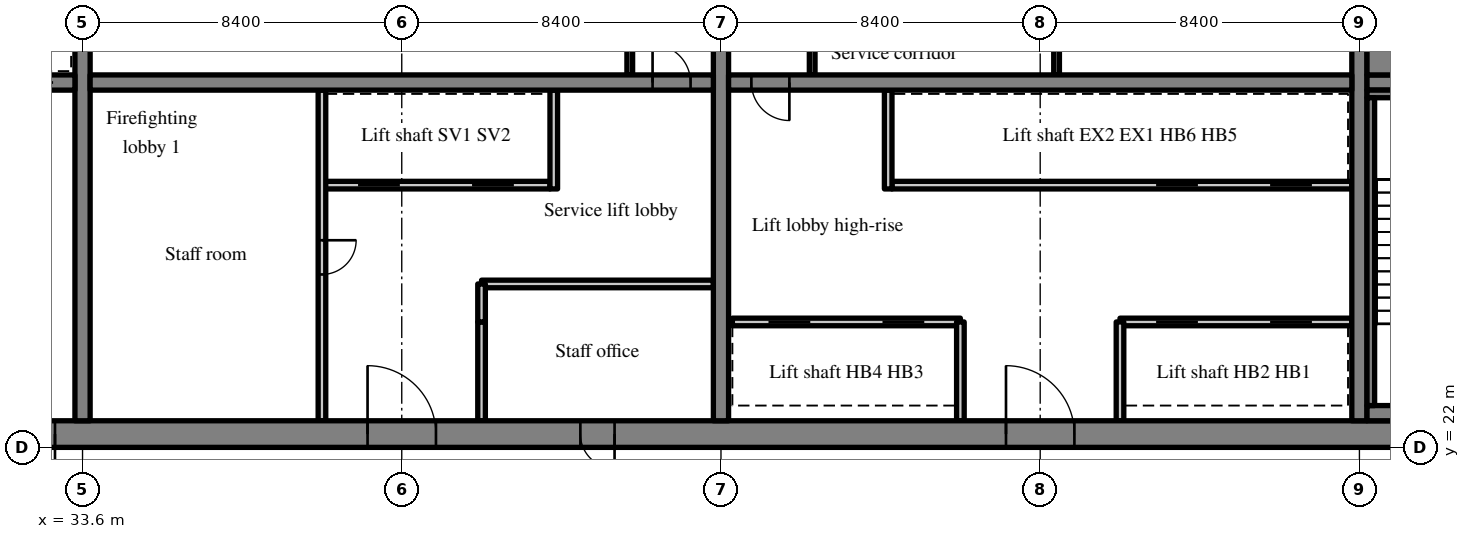
"""IFC4 building model, lengths in metres.
Left out: names, types, materials, properties, quantities, classifications, styles, units other than length and angle.
Written with IfcOpenShell. Run it as: python <this file> out.ifc"""

import sys

from ifc_helpers import new_model, si_unit, direction, frame, frame_2d, origin, place, context, subcontext, project, spatial, rectangle, extrude, source, transform, mapped, element, fill, save


model = new_model("IFC4")
c1 = context("Model", 3, precision=1e-05, world=origin(), true_north=direction((0.0, 1.0)))
c2 = subcontext(c1, "Body", "Model", "MODEL_VIEW")
j1 = project(units=[si_unit("LENGTHUNIT", "METRE"), si_unit("PLANEANGLEUNIT", "RADIAN")], contexts=[c1])
p1 = place(None, origin())
s1 = spatial("IfcSite", under=j1, at=p1, CompositionType="ELEMENT")
p2 = place(p1, origin())
s2 = spatial("IfcBuilding", under=s1, at=p2, CompositionType="ELEMENT")
p3 = place(p2, frame((0.0, 0.0, 151.6)))
s3 = spatial("IfcBuildingStorey", under=s2, at=p3, CompositionType="ELEMENT", Elevation=151.6)
m1 = source(origin(), c2, "Body", "SweptSolid", [
    extrude(rectangle(XDim=50.4, YDim=0.7, at=frame_2d((25.2, 0.0))), origin(), (0.0, 0.0, 1.0), 3.52),
])
p4 = place(p3, frame((25.2, 22.35, 0.0), z_axis=(0.0, 0.0, 1.0), x_axis=(1.0, 0.0, 0.0)))
e1 = element("IfcWall", 1, at=p4, inside=s3, PredefinedType="SHEAR", context=c2, shape_type="MappedRepresentation", body=[
    mapped(m1, transform((0.0, 0.0, 0.0), scale=1.0)),
])
m2 = source(origin(), c2, "Body", "SweptSolid", [
    extrude(rectangle(XDim=1.8, YDim=2.1, at=frame_2d((0.9, 1.05))), frame((0.0, 0.36, 0.0), z_axis=(0.0, -1.0, 0.0), x_axis=(1.0, 0.0, 0.0)), (0.0, 0.0, 1.0), 0.72),
])
p5 = place(p4, frame((15.9, 0.0, 0.0)))
e2 = element("IfcOpeningElement", 2, at=p5, cuts=e1, PredefinedType="OPENING", context=c2, shape_type="MappedRepresentation", body=[
    mapped(m2, transform((0.0, 0.0, 0.0), scale=1.0)),
])
m3 = source(origin(), c2, "Body", "SweptSolid", [
    extrude(rectangle(XDim=0.9, YDim=2.1, at=frame_2d((0.45, 1.05))), frame((0.0, 0.36, 0.0), z_axis=(0.0, -1.0, 0.0), x_axis=(1.0, 0.0, 0.0)), (0.0, 0.0, 1.0), 0.72),
])
p6 = place(p4, frame((21.5, 0.0, 0.0)))
e3 = element("IfcOpeningElement", 3, at=p6, cuts=e1, PredefinedType="OPENING", context=c2, shape_type="MappedRepresentation", body=[
    mapped(m3, transform((0.0, 0.0, 0.0), scale=1.0)),
])
p7 = place(p4, frame((32.7, 0.0, 0.0)))
e4 = element("IfcOpeningElement", 4, at=p7, cuts=e1, PredefinedType="OPENING", context=c2, shape_type="MappedRepresentation", body=[
    mapped(m2, transform((0.0, 0.0, 0.0), scale=1.0)),
])
m4 = source(origin(), c2, "Body", "SweptSolid", [
    extrude(rectangle(XDim=1.2, YDim=2.1, at=frame_2d((0.6, 1.05))), frame((0.0, 0.36, 0.0), z_axis=(0.0, -1.0, 0.0), x_axis=(1.0, 0.0, 0.0)), (0.0, 0.0, 1.0), 0.72),
])
p8 = place(p4, frame((6.475, 0.0, 0.0)))
e5 = element("IfcOpeningElement", 5, at=p8, cuts=e1, PredefinedType="OPENING", context=c2, shape_type="MappedRepresentation", body=[
    mapped(m4, transform((0.0, 0.0, 0.0), scale=1.0)),
])
p9 = place(p4, frame((47.875, 0.0, 0.0)))
e6 = element("IfcOpeningElement", 6, at=p9, cuts=e1, PredefinedType="OPENING", context=c2, shape_type="MappedRepresentation", body=[
    mapped(m4, transform((0.0, 0.0, 0.0), scale=1.0)),
])
m5 = source(origin(), c2, "Body", "SweptSolid", [
    extrude(rectangle(XDim=18.6, YDim=0.4, at=frame_2d((9.3, 0.0))), origin(), (0.0, 0.0, 1.0), 3.52),
])
p10 = place(p3, frame((33.6, 22.7, 0.0), z_axis=(0.0, 0.0, 1.0), x_axis=(0.0, 1.0, 0.0)))
e7 = element("IfcWall", 7, at=p10, inside=s3, PredefinedType="SHEAR", context=c2, shape_type="MappedRepresentation", body=[
    mapped(m5, transform((0.0, 0.0, 0.0), scale=1.0)),
])
m6 = source(origin(), c2, "Body", "SweptSolid", [
    extrude(rectangle(XDim=1.1, YDim=2.1, at=frame_2d((0.55, 1.05))), frame((0.0, 0.21, 0.0), z_axis=(0.0, -1.0, 0.0), x_axis=(1.0, 0.0, 0.0)), (0.0, 0.0, 1.0), 0.42),
])
p11 = place(p10, frame((12.75, 0.0, 0.0)))
e8 = element("IfcOpeningElement", 8, at=p11, cuts=e7, PredefinedType="OPENING", context=c2, shape_type="MappedRepresentation", body=[
    mapped(m6, transform((0.0, 0.0, 0.0), scale=1.0)),
])
p12 = place(p3, frame((50.4, 22.7, 0.0), z_axis=(0.0, 0.0, 1.0), x_axis=(0.0, 1.0, 0.0)))
e9 = element("IfcWall", 9, at=p12, inside=s3, PredefinedType="SHEAR", context=c2, shape_type="MappedRepresentation", body=[
    mapped(m5, transform((0.0, 0.0, 0.0), scale=1.0)),
])
p13 = place(p12, frame((12.75, 0.0, 0.0)))
e10 = element("IfcOpeningElement", 10, at=p13, cuts=e9, PredefinedType="OPENING", context=c2, shape_type="MappedRepresentation", body=[
    mapped(m6, transform((0.0, 0.0, 0.0), scale=1.0)),
])
p14 = place(p3, frame((67.2, 22.7, 0.0), z_axis=(0.0, 0.0, 1.0), x_axis=(0.0, 1.0, 0.0)))
e11 = element("IfcWall", 11, at=p14, inside=s3, PredefinedType="SHEAR", context=c2, shape_type="MappedRepresentation", body=[
    mapped(m5, transform((0.0, 0.0, 0.0), scale=1.0)),
])
m7 = source(origin(), c2, "Body", "SweptSolid", [
    extrude(rectangle(XDim=7.5, YDim=0.4, at=frame_2d((3.75, 0.0))), origin(), (0.0, 0.0, 1.0), 3.52),
])
p15 = place(p3, frame((25.9, 31.6, 0.0), z_axis=(0.0, 0.0, 1.0), x_axis=(1.0, 0.0, 0.0)))
e12 = element("IfcWall", 12, at=p15, inside=s3, PredefinedType="SHEAR", context=c2, shape_type="MappedRepresentation", body=[
    mapped(m7, transform((0.0, 0.0, 0.0), scale=1.0)),
])
p16 = place(p15, frame((5.825, 0.0, 0.0)))
e13 = element("IfcOpeningElement", 13, at=p16, cuts=e12, PredefinedType="OPENING", context=c2, shape_type="MappedRepresentation", body=[
    mapped(m6, transform((0.0, 0.0, 0.0), scale=1.0)),
])
m8 = source(origin(), c2, "Body", "SweptSolid", [
    extrude(rectangle(XDim=16.4, YDim=0.4, at=frame_2d((8.2, 0.0))), origin(), (0.0, 0.0, 1.0), 3.52),
])
p17 = place(p3, frame((33.8, 31.6, 0.0), z_axis=(0.0, 0.0, 1.0), x_axis=(1.0, 0.0, 0.0)))
e14 = element("IfcWall", 14, at=p17, inside=s3, PredefinedType="SHEAR", context=c2, shape_type="MappedRepresentation", body=[
    mapped(m8, transform((0.0, 0.0, 0.0), scale=1.0)),
])
m9 = source(origin(), c2, "Body", "SweptSolid", [
    extrude(rectangle(XDim=1.0, YDim=2.1, at=frame_2d((0.5, 1.05))), frame((0.0, 0.21, 0.0), z_axis=(0.0, -1.0, 0.0), x_axis=(1.0, 0.0, 0.0)), (0.0, 0.0, 1.0), 0.42),
])
p18 = place(p17, frame((14.8, 0.0, 0.0)))
e15 = element("IfcOpeningElement", 15, at=p18, cuts=e14, PredefinedType="OPENING", context=c2, shape_type="MappedRepresentation", body=[
    mapped(m9, transform((0.0, 0.0, 0.0), scale=1.0)),
])
p19 = place(p3, frame((50.6, 31.6, 0.0), z_axis=(0.0, 0.0, 1.0), x_axis=(1.0, 0.0, 0.0)))
e16 = element("IfcWall", 16, at=p19, inside=s3, PredefinedType="SHEAR", context=c2, shape_type="MappedRepresentation", body=[
    mapped(m8, transform((0.0, 0.0, 0.0), scale=1.0)),
])
p20 = place(p19, frame((0.6, 0.0, 0.0)))
e17 = element("IfcOpeningElement", 17, at=p20, cuts=e16, PredefinedType="OPENING", context=c2, shape_type="MappedRepresentation", body=[
    mapped(m9, transform((0.0, 0.0, 0.0), scale=1.0)),
])
p21 = place(p3, frame((67.4, 31.6, 0.0), z_axis=(0.0, 0.0, 1.0), x_axis=(1.0, 0.0, 0.0)))
e18 = element("IfcWall", 18, at=p21, inside=s3, PredefinedType="SHEAR", context=c2, shape_type="MappedRepresentation", body=[
    mapped(m7, transform((0.0, 0.0, 0.0), scale=1.0)),
])
p22 = place(p21, frame((5.725, 0.0, 0.0)))
e19 = element("IfcOpeningElement", 19, at=p22, cuts=e18, PredefinedType="OPENING", context=c2, shape_type="MappedRepresentation", body=[
    mapped(m6, transform((0.0, 0.0, 0.0), scale=1.0)),
])
m10 = source(origin(), c2, "Body", "SweptSolid", [
    extrude(rectangle(XDim=6.0, YDim=0.2, at=frame_2d((3.0, 0.0))), origin(), (0.0, 0.0, 1.0), 3.52),
])
p23 = place(p3, frame((39.9, 28.9, 0.0), z_axis=(0.0, 0.0, 1.0), x_axis=(1.0, 0.0, 0.0)))
e20 = element("IfcWall", 20, at=p23, inside=s3, PredefinedType="SOLIDWALL", context=c2, shape_type="MappedRepresentation", body=[
    mapped(m10, transform((0.0, 0.0, 0.0), scale=1.0)),
])
m11 = source(origin(), c2, "Body", "SweptSolid", [
    extrude(rectangle(XDim=1.1, YDim=2.1, at=frame_2d((0.55, 1.05))), frame((0.0, 0.11, 0.0), z_axis=(0.0, -1.0, 0.0), x_axis=(1.0, 0.0, 0.0)), (0.0, 0.0, 1.0), 0.22),
])
p24 = place(p23, frame((0.95, 0.0, 0.0)))
e21 = element("IfcOpeningElement", 21, at=p24, cuts=e20, PredefinedType="OPENING", context=c2, shape_type="MappedRepresentation", body=[
    mapped(m11, transform((0.0, 0.0, 0.0), scale=1.0)),
])
p25 = place(p23, frame((3.95, 0.0, 0.0)))
e22 = element("IfcOpeningElement", 22, at=p25, cuts=e20, PredefinedType="OPENING", context=c2, shape_type="MappedRepresentation", body=[
    mapped(m11, transform((0.0, 0.0, 0.0), scale=1.0)),
])
m12 = source(origin(), c2, "Body", "SweptSolid", [
    extrude(rectangle(XDim=8.7, YDim=0.2, at=frame_2d((4.35, 0.0))), origin(), (0.0, 0.0, 1.0), 3.52),
])
p26 = place(p3, frame((39.9, 22.7, 0.0), z_axis=(0.0, 0.0, 1.0), x_axis=(0.0, 1.0, 0.0)))
e23 = element("IfcWall", 23, at=p26, inside=s3, PredefinedType="PARTITIONING", context=c2, shape_type="MappedRepresentation", body=[
    mapped(m12, transform((0.0, 0.0, 0.0), scale=1.0)),
])
m13 = source(origin(), c2, "Body", "SweptSolid", [
    extrude(rectangle(XDim=0.9, YDim=2.1, at=frame_2d((0.45, 1.05))), frame((0.0, 0.11, 0.0), z_axis=(0.0, -1.0, 0.0), x_axis=(1.0, 0.0, 0.0)), (0.0, 0.0, 1.0), 0.22),
])
p27 = place(p26, frame((3.85, 0.0, 0.0)))
e24 = element("IfcOpeningElement", 24, at=p27, cuts=e23, PredefinedType="OPENING", context=c2, shape_type="MappedRepresentation", body=[
    mapped(m13, transform((0.0, 0.0, 0.0), scale=1.0)),
])
m14 = source(origin(), c2, "Body", "SweptSolid", [
    extrude(rectangle(XDim=2.6, YDim=0.2, at=frame_2d((1.3, 0.0))), origin(), (0.0, 0.0, 1.0), 3.52),
])
p28 = place(p3, frame((44.1, 22.7, 0.0), z_axis=(0.0, 0.0, 1.0), x_axis=(0.0, 1.0, 0.0)))
e25 = element("IfcWall", 25, at=p28, inside=s3, PredefinedType="PARTITIONING", context=c2, shape_type="MappedRepresentation", body=[
    mapped(m14, transform((0.0, 0.0, 0.0), scale=1.0)),
])
m15 = source(origin(), c2, "Body", "SweptSolid", [
    extrude(rectangle(XDim=2.6, YDim=0.2, at=frame_2d((1.3, 0.0))), origin(), (0.0, 0.0, 1.0), 3.52),
])
p29 = place(p3, frame((46.0, 28.8, 0.0), z_axis=(0.0, 0.0, 1.0), x_axis=(0.0, 1.0, 0.0)))
e26 = element("IfcWall", 26, at=p29, inside=s3, PredefinedType="SOLIDWALL", context=c2, shape_type="MappedRepresentation", body=[
    mapped(m15, transform((0.0, 0.0, 0.0), scale=1.0)),
])
m16 = source(origin(), c2, "Body", "SweptSolid", [
    extrude(rectangle(XDim=6.1, YDim=0.2, at=frame_2d((3.05, 0.0))), origin(), (0.0, 0.0, 1.0), 3.52),
])
p30 = place(p3, frame((44.1, 26.3, 0.0), z_axis=(0.0, 0.0, 1.0), x_axis=(1.0, 0.0, 0.0)))
e27 = element("IfcWall", 27, at=p30, inside=s3, PredefinedType="PARTITIONING", context=c2, shape_type="MappedRepresentation", body=[
    mapped(m16, transform((0.0, 0.0, 0.0), scale=1.0)),
])
m17 = source(origin(), c2, "Body", "SweptSolid", [
    extrude(rectangle(XDim=1.0, YDim=0.2, at=frame_2d((0.5, 0.0))), origin(), (0.0, 0.0, 1.0), 3.52),
])
p31 = place(p3, frame((44.1, 25.3, 0.0), z_axis=(0.0, 0.0, 1.0), x_axis=(0.0, 1.0, 0.0)))
e28 = element("IfcWall", 28, at=p31, inside=s3, PredefinedType="PARTITIONING", context=c2, shape_type="MappedRepresentation", body=[
    mapped(m17, transform((0.0, 0.0, 0.0), scale=1.0)),
])
m18 = source(origin(), c2, "Body", "SweptSolid", [
    extrude(rectangle(XDim=3.2, YDim=0.15, at=frame_2d((1.6, 0.0))), origin(), (0.0, 0.0, 1.0), 3.52),
])
p32 = place(p3, frame((48.0, 31.8, 0.0), z_axis=(0.0, 0.0, 1.0), x_axis=(0.0, 1.0, 0.0)))
e29 = element("IfcWall", 29, at=p32, inside=s3, PredefinedType="PARTITIONING", context=c2, shape_type="MappedRepresentation", body=[
    mapped(m18, transform((0.0, 0.0, 0.0), scale=1.0)),
])
m19 = source(origin(), c2, "Body", "SweptSolid", [
    extrude(rectangle(XDim=6.1, YDim=0.2, at=frame_2d((3.05, 0.0))), origin(), (0.0, 0.0, 1.0), 3.52),
])
p33 = place(p3, frame((67.0, 25.3, 0.0), z_axis=(0.0, 0.0, 1.0), x_axis=(-1.0, 0.0, 0.0)))
e30 = element("IfcWall", 30, at=p33, inside=s3, PredefinedType="SOLIDWALL", context=c2, shape_type="MappedRepresentation", body=[
    mapped(m19, transform((0.0, 0.0, 0.0), scale=1.0)),
])
p34 = place(p33, frame((1.05, 0.0, 0.0)))
e31 = element("IfcOpeningElement", 31, at=p34, cuts=e30, PredefinedType="OPENING", context=c2, shape_type="MappedRepresentation", body=[
    mapped(m11, transform((0.0, 0.0, 0.0), scale=1.0)),
])
p35 = place(p33, frame((4.05, 0.0, 0.0)))
e32 = element("IfcOpeningElement", 32, at=p35, cuts=e30, PredefinedType="OPENING", context=c2, shape_type="MappedRepresentation", body=[
    mapped(m11, transform((0.0, 0.0, 0.0), scale=1.0)),
])
p36 = place(p3, frame((56.7, 25.3, 0.0), z_axis=(0.0, 0.0, 1.0), x_axis=(-1.0, 0.0, 0.0)))
e33 = element("IfcWall", 33, at=p36, inside=s3, PredefinedType="SOLIDWALL", context=c2, shape_type="MappedRepresentation", body=[
    mapped(m10, transform((0.0, 0.0, 0.0), scale=1.0)),
])
p37 = place(p36, frame((0.95, 0.0, 0.0)))
e34 = element("IfcOpeningElement", 34, at=p37, cuts=e33, PredefinedType="OPENING", context=c2, shape_type="MappedRepresentation", body=[
    mapped(m11, transform((0.0, 0.0, 0.0), scale=1.0)),
])
p38 = place(p36, frame((3.95, 0.0, 0.0)))
e35 = element("IfcOpeningElement", 35, at=p38, cuts=e33, PredefinedType="OPENING", context=c2, shape_type="MappedRepresentation", body=[
    mapped(m11, transform((0.0, 0.0, 0.0), scale=1.0)),
])
m20 = source(origin(), c2, "Body", "SweptSolid", [
    extrude(rectangle(XDim=12.1, YDim=0.2, at=frame_2d((6.05, 0.0))), origin(), (0.0, 0.0, 1.0), 3.52),
])
p39 = place(p3, frame((67.0, 28.9, 0.0), z_axis=(0.0, 0.0, 1.0), x_axis=(-1.0, 0.0, 0.0)))
e36 = element("IfcWall", 36, at=p39, inside=s3, PredefinedType="SOLIDWALL", context=c2, shape_type="MappedRepresentation", body=[
    mapped(m20, transform((0.0, 0.0, 0.0), scale=1.0)),
])
p40 = place(p39, frame((1.05, 0.0, 0.0)))
e37 = element("IfcOpeningElement", 37, at=p40, cuts=e36, PredefinedType="OPENING", context=c2, shape_type="MappedRepresentation", body=[
    mapped(m11, transform((0.0, 0.0, 0.0), scale=1.0)),
])
p41 = place(p39, frame((4.05, 0.0, 0.0)))
e38 = element("IfcOpeningElement", 38, at=p41, cuts=e36, PredefinedType="OPENING", context=c2, shape_type="MappedRepresentation", body=[
    mapped(m11, transform((0.0, 0.0, 0.0), scale=1.0)),
])
for number, where, z_axis, x_axis in (
    (39, (60.9, 22.7, 0.0), (0.0, 0.0, 1.0), (0.0, 1.0, 0.0)),
    (40, (56.7, 22.7, 0.0), (0.0, 0.0, 1.0), (0.0, 1.0, 0.0)),
):
    element("IfcWall", number, at=place(p3, frame(where, z_axis=z_axis, x_axis=x_axis)), inside=s3, PredefinedType="SOLIDWALL", context=c2, shape_type="MappedRepresentation", body=[
        mapped(m14, transform((0.0, 0.0, 0.0), scale=1.0)),
    ])
p42 = place(p3, frame((54.8, 28.8, 0.0), z_axis=(0.0, 0.0, 1.0), x_axis=(0.0, 1.0, 0.0)))
e41 = element("IfcWall", 41, at=p42, inside=s3, PredefinedType="SOLIDWALL", context=c2, shape_type="MappedRepresentation", body=[
    mapped(m15, transform((0.0, 0.0, 0.0), scale=1.0)),
])
for number, where, z_axis, x_axis in (
    (42, (52.8, 31.8, 0.0), (0.0, 0.0, 1.0), (0.0, 1.0, 0.0)),
    (43, (59.231, 31.8, 0.0), (0.0, 0.0, 1.0), (0.0, 1.0, 0.0)),
):
    element("IfcWall", number, at=place(p3, frame(where, z_axis=z_axis, x_axis=x_axis)), inside=s3, PredefinedType="PARTITIONING", context=c2, shape_type="MappedRepresentation", body=[
        mapped(m18, transform((0.0, 0.0, 0.0), scale=1.0)),
    ])
m21 = source(origin(), c2, "Body", "SweptSolid", [
    extrude(rectangle(XDim=4.85, YDim=0.4, at=frame_2d((2.425, 0.0))), origin(), (0.0, 0.0, 1.0), 3.52),
])
p43 = place(p3, frame((67.4, 22.9, 0.0), z_axis=(0.0, 0.0, 1.0), x_axis=(1.0, 0.0, 0.0)))
e44 = element("IfcWall", 44, at=p43, inside=s3, PredefinedType="SOLIDWALL", context=c2, shape_type="MappedRepresentation", body=[
    mapped(m21, transform((0.0, 0.0, 0.0), scale=1.0)),
])
m22 = source(origin(), c2, "Body", "SweptSolid", [
    extrude(rectangle(XDim=4.85, YDim=0.2, at=frame_2d((2.425, 0.0))), origin(), (0.0, 0.0, 1.0), 3.52),
])
p44 = place(p3, frame((67.4, 31.3, 0.0), z_axis=(0.0, 0.0, 1.0), x_axis=(1.0, 0.0, 0.0)))
e45 = element("IfcWall", 45, at=p44, inside=s3, PredefinedType="SOLIDWALL", context=c2, shape_type="MappedRepresentation", body=[
    mapped(m22, transform((0.0, 0.0, 0.0), scale=1.0)),
])
m23 = source(origin(), c2, "Body", "SweptSolid", [
    extrude(rectangle(XDim=8.1, YDim=0.2, at=frame_2d((4.05, 0.0))), origin(), (0.0, 0.0, 1.0), 3.52),
])
p45 = place(p3, frame((67.5, 23.1, 0.0), z_axis=(0.0, 0.0, 1.0), x_axis=(0.0, 1.0, 0.0)))
e46 = element("IfcWall", 46, at=p45, inside=s3, PredefinedType="SOLIDWALL", context=c2, shape_type="MappedRepresentation", body=[
    mapped(m23, transform((0.0, 0.0, 0.0), scale=1.0)),
])
m24 = source(origin(), c2, "Body", "SweptSolid", [
    extrude(rectangle(XDim=4.85, YDim=1.0, at=frame_2d((2.425, 0.0))), origin(), (0.0, 0.0, 1.0), 3.52),
])
p46 = place(p3, frame((67.4, 32.3, 0.0), z_axis=(0.0, 0.0, 1.0), x_axis=(1.0, 0.0, 0.0)))
e47 = element("IfcWall", 47, at=p46, inside=s3, PredefinedType="SOLIDWALL", context=c2, shape_type="MappedRepresentation", body=[
    mapped(m24, transform((0.0, 0.0, 0.0), scale=1.0)),
])
m25 = source(origin(), c2, "Body", "SweptSolid", [
    extrude(rectangle(XDim=1.8, YDim=2.1, at=frame_2d((0.9, 1.05))), frame((0.0, 0.275, 0.0), z_axis=(0.0, -1.0, 0.0), x_axis=(1.0, 0.0, 0.0)), (0.0, 0.0, 1.0), 0.05),
])
p47 = place(p5, origin())
e48 = element("IfcDoor", 48, at=p47, inside=s3, OperationType="DOUBLE_DOOR_SINGLE_SWING", PredefinedType="DOOR", context=c2, shape_type="MappedRepresentation", body=[
    mapped(m25, transform((0.0, 0.0, 0.0), scale=1.0)),
])
fill(e2, e48)
m26 = source(origin(), c2, "Body", "SweptSolid", [
    extrude(rectangle(XDim=1.0, YDim=2.1, at=frame_2d((0.5, 1.05))), frame((0.0, 0.025, 0.0), z_axis=(0.0, -1.0, 0.0), x_axis=(1.0, 0.0, 0.0)), (0.0, 0.0, 1.0), 0.05),
])
p48 = place(p18, origin())
e49 = element("IfcDoor", 49, at=p48, inside=s3, OperationType="SINGLE_SWING_LEFT", PredefinedType="DOOR", context=c2, shape_type="MappedRepresentation", body=[
    mapped(m26, transform((0.0, 0.0, 0.0), scale=1.0)),
])
fill(e15, e49)
m27 = source(origin(), c2, "Body", "SweptSolid", [
    extrude(rectangle(XDim=1.1, YDim=2.1, at=frame_2d((0.55, 1.05))), frame((0.0, 0.025, 0.0), z_axis=(0.0, -1.0, 0.0), x_axis=(1.0, 0.0, 0.0)), (0.0, 0.0, 1.0), 0.05),
])
p49 = place(p24, origin())
e50 = element("IfcDoor", 50, at=p49, inside=s3, OperationType="SLIDING_TO_LEFT", PredefinedType="DOOR", context=c2, shape_type="MappedRepresentation", body=[
    mapped(m27, transform((0.0, 0.0, 0.0), scale=1.0)),
])
fill(e21, e50)
p50 = place(p25, origin())
e51 = element("IfcDoor", 51, at=p50, inside=s3, OperationType="SLIDING_TO_RIGHT", PredefinedType="DOOR", context=c2, shape_type="MappedRepresentation", body=[
    mapped(m27, transform((0.0, 0.0, 0.0), scale=1.0)),
])
fill(e22, e51)
m28 = source(origin(), c2, "Body", "SweptSolid", [
    extrude(rectangle(XDim=0.9, YDim=2.1, at=frame_2d((0.45, 1.05))), frame((0.0, 0.025, 0.0), z_axis=(0.0, -1.0, 0.0), x_axis=(1.0, 0.0, 0.0)), (0.0, 0.0, 1.0), 0.05),
])
p51 = place(p27, origin())
e52 = element("IfcDoor", 52, at=p51, inside=s3, OperationType="SINGLE_SWING_RIGHT", PredefinedType="DOOR", context=c2, shape_type="MappedRepresentation", body=[
    mapped(m28, transform((0.0, 0.0, 0.0), scale=1.0)),
])
fill(e24, e52)
m29 = source(origin(), c2, "Body", "SweptSolid", [
    extrude(rectangle(XDim=0.9, YDim=2.1, at=frame_2d((0.45, 1.05))), frame((0.0, 0.275, 0.0), z_axis=(0.0, -1.0, 0.0), x_axis=(1.0, 0.0, 0.0)), (0.0, 0.0, 1.0), 0.05),
])
p52 = place(p6, origin())
e53 = element("IfcDoor", 53, at=p52, inside=s3, OperationType="SINGLE_SWING_RIGHT", PredefinedType="DOOR", context=c2, shape_type="MappedRepresentation", body=[
    mapped(m29, transform((0.0, 0.0, 0.0), scale=1.0)),
])
fill(e3, e53)
p53 = place(p7, origin())
e54 = element("IfcDoor", 54, at=p53, inside=s3, OperationType="DOUBLE_DOOR_SINGLE_SWING", PredefinedType="DOOR", context=c2, shape_type="MappedRepresentation", body=[
    mapped(m25, transform((0.0, 0.0, 0.0), scale=1.0)),
])
fill(e4, e54)
p54 = place(p20, origin())
e55 = element("IfcDoor", 55, at=p54, inside=s3, OperationType="SINGLE_SWING_RIGHT", PredefinedType="DOOR", context=c2, shape_type="MappedRepresentation", body=[
    mapped(m26, transform((0.0, 0.0, 0.0), scale=1.0)),
])
fill(e17, e55)
p55 = place(p34, origin())
e56 = element("IfcDoor", 56, at=p55, inside=s3, OperationType="SLIDING_TO_RIGHT", PredefinedType="DOOR", context=c2, shape_type="MappedRepresentation", body=[
    mapped(m27, transform((0.0, 0.0, 0.0), scale=1.0)),
])
fill(e31, e56)
p56 = place(p35, origin())
e57 = element("IfcDoor", 57, at=p56, inside=s3, OperationType="SLIDING_TO_LEFT", PredefinedType="DOOR", context=c2, shape_type="MappedRepresentation", body=[
    mapped(m27, transform((0.0, 0.0, 0.0), scale=1.0)),
])
fill(e32, e57)
p57 = place(p37, origin())
e58 = element("IfcDoor", 58, at=p57, inside=s3, OperationType="SLIDING_TO_RIGHT", PredefinedType="DOOR", context=c2, shape_type="MappedRepresentation", body=[
    mapped(m27, transform((0.0, 0.0, 0.0), scale=1.0)),
])
fill(e34, e58)
p58 = place(p38, origin())
e59 = element("IfcDoor", 59, at=p58, inside=s3, OperationType="SLIDING_TO_LEFT", PredefinedType="DOOR", context=c2, shape_type="MappedRepresentation", body=[
    mapped(m27, transform((0.0, 0.0, 0.0), scale=1.0)),
])
fill(e35, e59)
p59 = place(p40, origin())
e60 = element("IfcDoor", 60, at=p59, inside=s3, OperationType="SLIDING_TO_RIGHT", PredefinedType="DOOR", context=c2, shape_type="MappedRepresentation", body=[
    mapped(m27, transform((0.0, 0.0, 0.0), scale=1.0)),
])
fill(e37, e60)
p60 = place(p41, origin())
e61 = element("IfcDoor", 61, at=p60, inside=s3, OperationType="SLIDING_TO_LEFT", PredefinedType="DOOR", context=c2, shape_type="MappedRepresentation", body=[
    mapped(m27, transform((0.0, 0.0, 0.0), scale=1.0)),
])
fill(e38, e61)
m30 = source(origin(), c2, "Body", "SweptSolid", [
    extrude(rectangle(XDim=1.2, YDim=2.1, at=frame_2d((0.6, 1.05))), frame((0.0, 0.275, 0.0), z_axis=(0.0, -1.0, 0.0), x_axis=(1.0, 0.0, 0.0)), (0.0, 0.0, 1.0), 0.05),
])
p61 = place(p8, origin())
e62 = element("IfcDoor", 62, at=p61, inside=s3, OperationType="SINGLE_SWING_RIGHT", PredefinedType="DOOR", context=c2, shape_type="MappedRepresentation", body=[
    mapped(m30, transform((0.0, 0.0, 0.0), scale=1.0)),
])
fill(e5, e62)
p62 = place(p16, origin())
e63 = element("IfcDoor", 63, at=p62, inside=s3, OperationType="SLIDING_TO_RIGHT", PredefinedType="DOOR", context=c2, shape_type="MappedRepresentation", body=[
    mapped(m27, transform((0.0, 0.0, 0.0), scale=1.0)),
])
fill(e13, e63)
save(model, sys.argv[1])
